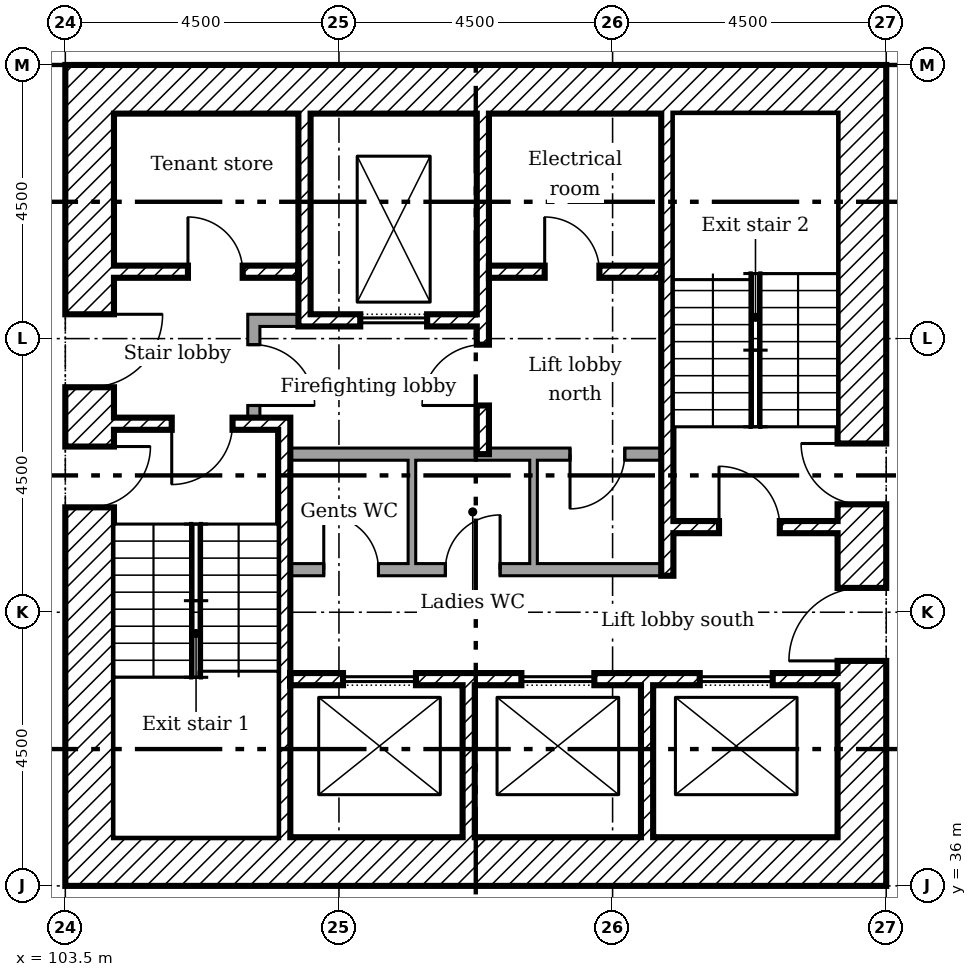
"""IFC4 building model, lengths in metres.
Left out: names, types, materials, properties, quantities, classifications, styles, units other than length and angle.
Written with IfcOpenShell. Run it as: python <this file> out.ifc"""

import sys

from ifc_helpers import new_model, si_unit, direction, frame, frame_2d, origin, place, context, subcontext, project, spatial, rectangle, extrude, element, fill, save


model = new_model("IFC4")
c1 = context("Model", 3, precision=1e-05, world=origin(), true_north=direction((0.0, 1.0)))
c2 = subcontext(c1, "Body", "Model", "MODEL_VIEW")
j1 = project(units=[si_unit("LENGTHUNIT", "METRE"), si_unit("PLANEANGLEUNIT", "RADIAN")], contexts=[c1])
p1 = place(None, origin())
s1 = spatial("IfcSite", under=j1, at=p1, CompositionType="ELEMENT")
p2 = place(p1, origin())
s2 = spatial("IfcBuilding", under=s1, at=p2, CompositionType="ELEMENT")
p3 = place(p2, frame((0.0, 0.0, 47.4)))
s3 = spatial("IfcBuildingStorey", under=s2, at=p3, CompositionType="ELEMENT", Elevation=47.4)
p4 = place(p3, frame((116.6, 36.0, 0.0), z_axis=(0.0, 0.0, 1.0), x_axis=(0.0, 1.0, 0.0)))
e1 = element("IfcWall", 1, at=p4, inside=s3, PredefinedType="SHEAR", context=c2, shape_type="SweptSolid", body=[
    extrude(rectangle(XDim=13.5, YDim=0.8, at=frame_2d((6.75, 0.0))), origin(), (0.0, 0.0, 1.0), 3.35),
])
p5 = place(p4, frame((3.7, 0.0, 0.0)))
e2 = element("IfcOpeningElement", 2, at=p5, cuts=e1, PredefinedType="OPENING", context=c2, shape_type="SweptSolid", body=[
    extrude(rectangle(XDim=1.2, YDim=2.1, at=frame_2d((0.6, 1.05))), frame((0.0, 0.41, 0.0), z_axis=(0.0, -1.0, 0.0), x_axis=(1.0, 0.0, 0.0)), (0.0, 0.0, 1.0), 0.82),
])
p6 = place(p4, frame((6.275, 0.0, 0.0)))
e3 = element("IfcOpeningElement", 3, at=p6, cuts=e1, PredefinedType="OPENING", context=c2, shape_type="SweptSolid", body=[
    extrude(rectangle(XDim=1.0, YDim=2.1, at=frame_2d((0.5, 1.05))), frame((0.0, 0.41, 0.0), z_axis=(0.0, -1.0, 0.0), x_axis=(1.0, 0.0, 0.0)), (0.0, 0.0, 1.0), 0.82),
])
for number, where in (
    (4, (104.3, 49.1, 0.0)),
    (5, (104.3, 36.4, 0.0)),
):
    element("IfcWall", number, at=place(p3, frame(where)), inside=s3, PredefinedType="SHEAR", context=c2, shape_type="SweptSolid", body=[
        extrude(rectangle(XDim=11.9, YDim=0.8, at=frame_2d((5.95, 0.0))), origin(), (0.0, 0.0, 1.0), 3.35),
    ])
p7 = place(p3, frame((103.9, 36.0, 0.0), z_axis=(0.0, 0.0, 1.0), x_axis=(0.0, 1.0, 0.0)))
e6 = element("IfcWall", 6, at=p7, inside=s3, PredefinedType="SHEAR", context=c2, shape_type="SweptSolid", body=[
    extrude(rectangle(XDim=13.5, YDim=0.8, at=frame_2d((6.75, 0.0))), origin(), (0.0, 0.0, 1.0), 3.35),
])
p8 = place(p7, frame((8.2, 0.0, 0.0)))
e7 = element("IfcOpeningElement", 7, at=p8, cuts=e6, PredefinedType="OPENING", context=c2, shape_type="SweptSolid", body=[
    extrude(rectangle(XDim=1.2, YDim=2.1, at=frame_2d((0.6, 1.05))), frame((0.0, 0.41, 0.0), z_axis=(0.0, -1.0, 0.0), x_axis=(1.0, 0.0, 0.0)), (0.0, 0.0, 1.0), 0.82),
])
p9 = place(p7, frame((6.225, 0.0, 0.0)))
e8 = element("IfcOpeningElement", 8, at=p9, cuts=e6, PredefinedType="OPENING", context=c2, shape_type="SweptSolid", body=[
    extrude(rectangle(XDim=1.0, YDim=2.1, at=frame_2d((0.5, 1.05))), frame((0.0, 0.41, 0.0), z_axis=(0.0, -1.0, 0.0), x_axis=(1.0, 0.0, 0.0)), (0.0, 0.0, 1.0), 0.82),
])
p10 = place(p3, frame((107.433, 48.7, 0.0), z_axis=(0.0, 0.0, 1.0), x_axis=(0.0, -1.0, 0.0)))
e9 = element("IfcWall", 9, at=p10, inside=s3, PredefinedType="SHEAR", context=c2, shape_type="SweptSolid", body=[
    extrude(rectangle(XDim=3.5, YDim=0.2, at=frame_2d((1.75, 0.0))), origin(), (0.0, 0.0, 1.0), 3.35),
])
p11 = place(p3, frame((110.367, 48.7, 0.0), z_axis=(0.0, 0.0, 1.0), x_axis=(0.0, -1.0, 0.0)))
e10 = element("IfcWall", 10, at=p11, inside=s3, PredefinedType="SHEAR", context=c2, shape_type="SweptSolid", body=[
    extrude(rectangle(XDim=5.6, YDim=0.2, at=frame_2d((2.8, 0.0))), origin(), (0.0, 0.0, 1.0), 3.35),
])
p12 = place(p11, frame((3.8, 0.0, 0.0)))
e11 = element("IfcOpeningElement", 11, at=p12, cuts=e10, PredefinedType="OPENING", context=c2, shape_type="SweptSolid", body=[
    extrude(rectangle(XDim=1.0, YDim=2.1, at=frame_2d((0.5, 1.05))), frame((0.0, 0.11, 0.0), z_axis=(0.0, -1.0, 0.0), x_axis=(1.0, 0.0, 0.0)), (0.0, 0.0, 1.0), 0.22),
])
for number, where, z_axis, x_axis in (
    (12, (110.133, 36.8, 0.0), (0.0, 0.0, 1.0), (0.0, 1.0, 0.0)),
    (13, (113.067, 36.8, 0.0), (0.0, 0.0, 1.0), (0.0, 1.0, 0.0)),
):
    element("IfcWall", number, at=place(p3, frame(where, z_axis=z_axis, x_axis=x_axis)), inside=s3, PredefinedType="SHEAR", context=c2, shape_type="SweptSolid", body=[
        extrude(rectangle(XDim=2.5, YDim=0.2, at=frame_2d((1.25, 0.0))), origin(), (0.0, 0.0, 1.0), 3.35),
    ])
p13 = place(p3, frame((106.5, 45.3, 0.0)))
e14 = element("IfcWall", 14, at=p13, inside=s3, PredefinedType="PARTITIONING", context=c2, shape_type="SweptSolid", body=[
    extrude(rectangle(XDim=0.833, YDim=0.2, at=frame_2d((0.417, 0.0))), origin(), (0.0, 0.0, 1.0), 3.35),
])
p14 = place(p3, frame((106.6, 43.7, 0.0), z_axis=(0.0, 0.0, 1.0), x_axis=(0.0, 1.0, 0.0)))
e15 = element("IfcWall", 15, at=p14, inside=s3, PredefinedType="PARTITIONING", context=c2, shape_type="SweptSolid", body=[
    extrude(rectangle(XDim=1.5, YDim=0.2, at=frame_2d((0.75, 0.0))), origin(), (0.0, 0.0, 1.0), 3.35),
])
p15 = place(p14, frame((0.2, 0.0, 0.0)))
e16 = element("IfcOpeningElement", 16, at=p15, cuts=e15, PredefinedType="OPENING", context=c2, shape_type="SweptSolid", body=[
    extrude(rectangle(XDim=1.0, YDim=2.1, at=frame_2d((0.5, 1.05))), frame((0.0, 0.11, 0.0), z_axis=(0.0, -1.0, 0.0), x_axis=(1.0, 0.0, 0.0)), (0.0, 0.0, 1.0), 0.22),
])
p16 = place(p3, frame((104.3, 46.1, 0.0)))
e17 = element("IfcWall", 17, at=p16, inside=s3, PredefinedType="SHEAR", context=c2, shape_type="SweptSolid", body=[
    extrude(rectangle(XDim=3.033, YDim=0.2, at=frame_2d((1.517, 0.0))), origin(), (0.0, 0.0, 1.0), 3.35),
])
p17 = place(p16, frame((1.217, 0.0, 0.0)))
e18 = element("IfcOpeningElement", 18, at=p17, cuts=e17, PredefinedType="OPENING", context=c2, shape_type="SweptSolid", body=[
    extrude(rectangle(XDim=0.9, YDim=2.1, at=frame_2d((0.45, 1.05))), frame((0.0, 0.11, 0.0), z_axis=(0.0, -1.0, 0.0), x_axis=(1.0, 0.0, 0.0)), (0.0, 0.0, 1.0), 0.22),
])
p18 = place(p3, frame((110.467, 46.1, 0.0)))
e19 = element("IfcWall", 19, at=p18, inside=s3, PredefinedType="SHEAR", context=c2, shape_type="SweptSolid", body=[
    extrude(rectangle(XDim=2.833, YDim=0.2, at=frame_2d((1.417, 0.0))), origin(), (0.0, 0.0, 1.0), 3.35),
])
p19 = place(p18, frame((0.917, 0.0, 0.0)))
e20 = element("IfcOpeningElement", 20, at=p19, cuts=e19, PredefinedType="OPENING", context=c2, shape_type="SweptSolid", body=[
    extrude(rectangle(XDim=0.9, YDim=2.1, at=frame_2d((0.45, 1.05))), frame((0.0, 0.11, 0.0), z_axis=(0.0, -1.0, 0.0), x_axis=(1.0, 0.0, 0.0)), (0.0, 0.0, 1.0), 0.22),
])
p20 = place(p3, frame((107.533, 45.3, 0.0)))
e21 = element("IfcWall", 21, at=p20, inside=s3, PredefinedType="SHEAR", context=c2, shape_type="SweptSolid", body=[
    extrude(rectangle(XDim=2.733, YDim=0.2, at=frame_2d((1.367, 0.0))), origin(), (0.0, 0.0, 1.0), 3.35),
])
p21 = place(p20, frame((0.817, 0.0, 0.0)))
e22 = element("IfcOpeningElement", 22, at=p21, cuts=e21, PredefinedType="OPENING", context=c2, shape_type="SweptSolid", body=[
    extrude(rectangle(XDim=1.1, YDim=2.1, at=frame_2d((0.55, 1.05))), frame((0.0, 0.11, 0.0), z_axis=(0.0, -1.0, 0.0), x_axis=(1.0, 0.0, 0.0)), (0.0, 0.0, 1.0), 0.22),
])
p22 = place(p3, frame((107.2, 39.4, 0.0)))
e23 = element("IfcWall", 23, at=p22, inside=s3, PredefinedType="SHEAR", context=c2, shape_type="SweptSolid", body=[
    extrude(rectangle(XDim=9.0, YDim=0.2, at=frame_2d((4.5, 0.0))), origin(), (0.0, 0.0, 1.0), 3.35),
])
p23 = place(p22, frame((0.867, 0.0, 0.0)))
e24 = element("IfcOpeningElement", 24, at=p23, cuts=e23, PredefinedType="OPENING", context=c2, shape_type="SweptSolid", body=[
    extrude(rectangle(XDim=1.2, YDim=2.1, at=frame_2d((0.6, 1.05))), frame((0.0, 0.11, 0.0), z_axis=(0.0, -1.0, 0.0), x_axis=(1.0, 0.0, 0.0)), (0.0, 0.0, 1.0), 0.22),
])
p24 = place(p22, frame((3.8, 0.0, 0.0)))
e25 = element("IfcOpeningElement", 25, at=p24, cuts=e23, PredefinedType="OPENING", context=c2, shape_type="SweptSolid", body=[
    extrude(rectangle(XDim=1.2, YDim=2.1, at=frame_2d((0.6, 1.05))), frame((0.0, 0.11, 0.0), z_axis=(0.0, -1.0, 0.0), x_axis=(1.0, 0.0, 0.0)), (0.0, 0.0, 1.0), 0.22),
])
p25 = place(p22, frame((6.733, 0.0, 0.0)))
e26 = element("IfcOpeningElement", 26, at=p25, cuts=e23, PredefinedType="OPENING", context=c2, shape_type="SweptSolid", body=[
    extrude(rectangle(XDim=1.2, YDim=2.1, at=frame_2d((0.6, 1.05))), frame((0.0, 0.11, 0.0), z_axis=(0.0, -1.0, 0.0), x_axis=(1.0, 0.0, 0.0)), (0.0, 0.0, 1.0), 0.22),
])
p26 = place(p3, frame((107.1, 36.8, 0.0), z_axis=(0.0, 0.0, 1.0), x_axis=(0.0, 1.0, 0.0)))
e27 = element("IfcWall", 27, at=p26, inside=s3, PredefinedType="SHEAR", context=c2, shape_type="SweptSolid", body=[
    extrude(rectangle(XDim=6.9, YDim=0.2, at=frame_2d((3.45, 0.0))), origin(), (0.0, 0.0, 1.0), 3.35),
])
p27 = place(p3, frame((104.3, 43.6, 0.0)))
e28 = element("IfcWall", 28, at=p27, inside=s3, PredefinedType="SHEAR", context=c2, shape_type="SweptSolid", body=[
    extrude(rectangle(XDim=2.7, YDim=0.2, at=frame_2d((1.35, 0.0))), origin(), (0.0, 0.0, 1.0), 3.35),
])
p28 = place(p27, frame((0.95, 0.0, 0.0)))
e29 = element("IfcOpeningElement", 29, at=p28, cuts=e28, PredefinedType="OPENING", context=c2, shape_type="SweptSolid", body=[
    extrude(rectangle(XDim=1.0, YDim=2.1, at=frame_2d((0.5, 1.05))), frame((0.0, 0.11, 0.0), z_axis=(0.0, -1.0, 0.0), x_axis=(1.0, 0.0, 0.0)), (0.0, 0.0, 1.0), 0.22),
])
p29 = place(p3, frame((113.5, 41.9, 0.0)))
e30 = element("IfcWall", 30, at=p29, inside=s3, PredefinedType="SHEAR", context=c2, shape_type="SweptSolid", body=[
    extrude(rectangle(XDim=2.7, YDim=0.2, at=frame_2d((1.35, 0.0))), origin(), (0.0, 0.0, 1.0), 3.35),
])
p30 = place(p29, frame((0.75, 0.0, 0.0)))
e31 = element("IfcOpeningElement", 31, at=p30, cuts=e30, PredefinedType="OPENING", context=c2, shape_type="SweptSolid", body=[
    extrude(rectangle(XDim=1.0, YDim=2.1, at=frame_2d((0.5, 1.05))), frame((0.0, 0.11, 0.0), z_axis=(0.0, -1.0, 0.0), x_axis=(1.0, 0.0, 0.0)), (0.0, 0.0, 1.0), 0.22),
])
p31 = place(p3, frame((113.4, 41.1, 0.0), z_axis=(0.0, 0.0, 1.0), x_axis=(0.0, 1.0, 0.0)))
e32 = element("IfcWall", 32, at=p31, inside=s3, PredefinedType="SHEAR", context=c2, shape_type="SweptSolid", body=[
    extrude(rectangle(XDim=7.6, YDim=0.2, at=frame_2d((3.8, 0.0))), origin(), (0.0, 0.0, 1.0), 3.35),
])
p32 = place(p3, frame((107.2, 43.1, 0.0)))
e33 = element("IfcWall", 33, at=p32, inside=s3, PredefinedType="PARTITIONING", context=c2, shape_type="SweptSolid", body=[
    extrude(rectangle(XDim=6.1, YDim=0.2, at=frame_2d((3.05, 0.0))), origin(), (0.0, 0.0, 1.0), 3.35),
])
p33 = place(p32, frame((4.6, 0.0, 0.0)))
e34 = element("IfcOpeningElement", 34, at=p33, cuts=e33, PredefinedType="OPENING", context=c2, shape_type="SweptSolid", body=[
    extrude(rectangle(XDim=0.9, YDim=2.1, at=frame_2d((0.45, 1.05))), frame((0.0, 0.11, 0.0), z_axis=(0.0, -1.0, 0.0), x_axis=(1.0, 0.0, 0.0)), (0.0, 0.0, 1.0), 0.22),
])
p34 = place(p3, frame((107.2, 41.2, 0.0)))
e35 = element("IfcWall", 35, at=p34, inside=s3, PredefinedType="PARTITIONING", context=c2, shape_type="SweptSolid", body=[
    extrude(rectangle(XDim=6.1, YDim=0.2, at=frame_2d((3.05, 0.0))), origin(), (0.0, 0.0, 1.0), 3.35),
])
p35 = place(p34, frame((0.55, 0.0, 0.0)))
e36 = element("IfcOpeningElement", 36, at=p35, cuts=e35, PredefinedType="OPENING", context=c2, shape_type="SweptSolid", body=[
    extrude(rectangle(XDim=0.9, YDim=2.1, at=frame_2d((0.45, 1.05))), frame((0.0, 0.11, 0.0), z_axis=(0.0, -1.0, 0.0), x_axis=(1.0, 0.0, 0.0)), (0.0, 0.0, 1.0), 0.22),
])
p36 = place(p34, frame((2.55, 0.0, 0.0)))
e37 = element("IfcOpeningElement", 37, at=p36, cuts=e35, PredefinedType="OPENING", context=c2, shape_type="SweptSolid", body=[
    extrude(rectangle(XDim=0.9, YDim=2.1, at=frame_2d((0.45, 1.05))), frame((0.0, 0.11, 0.0), z_axis=(0.0, -1.0, 0.0), x_axis=(1.0, 0.0, 0.0)), (0.0, 0.0, 1.0), 0.22),
])
for number, where, z_axis, x_axis in (
    (38, (109.2, 41.3, 0.0), (0.0, 0.0, 1.0), (0.0, 1.0, 0.0)),
    (39, (111.2, 41.3, 0.0), (0.0, 0.0, 1.0), (0.0, 1.0, 0.0)),
):
    element("IfcWall", number, at=place(p3, frame(where, z_axis=z_axis, x_axis=x_axis)), inside=s3, PredefinedType="PARTITIONING", context=c2, shape_type="SweptSolid", body=[
        extrude(rectangle(XDim=1.7, YDim=0.125, at=frame_2d((0.85, 0.0))), origin(), (0.0, 0.0, 1.0), 3.35),
    ])
p37 = place(p8, frame((1.2, 0.0, 0.0), x_axis=(-1.0, 0.0, 0.0)))
e40 = element("IfcDoor", 40, at=p37, inside=s3, OperationType="SINGLE_SWING_RIGHT", PredefinedType="DOOR", context=c2, shape_type="SweptSolid", body=[
    extrude(rectangle(XDim=1.2, YDim=2.1, at=frame_2d((0.6, 1.05))), frame((0.0, 0.025, 0.0), z_axis=(0.0, -1.0, 0.0), x_axis=(1.0, 0.0, 0.0)), (0.0, 0.0, 1.0), 0.05),
])
fill(e7, e40)
p38 = place(p5, origin())
e41 = element("IfcDoor", 41, at=p38, inside=s3, OperationType="SINGLE_SWING_RIGHT", PredefinedType="DOOR", context=c2, shape_type="SweptSolid", body=[
    extrude(rectangle(XDim=1.2, YDim=2.1, at=frame_2d((0.6, 1.05))), frame((0.0, 0.025, 0.0), z_axis=(0.0, -1.0, 0.0), x_axis=(1.0, 0.0, 0.0)), (0.0, 0.0, 1.0), 0.05),
])
fill(e2, e41)
p39 = place(p28, frame((1.0, 0.0, 0.0), x_axis=(-1.0, 0.0, 0.0)))
e42 = element("IfcDoor", 42, at=p39, inside=s3, OperationType="SINGLE_SWING_LEFT", PredefinedType="DOOR", context=c2, shape_type="SweptSolid", body=[
    extrude(rectangle(XDim=1.0, YDim=2.1, at=frame_2d((0.5, 1.05))), frame((0.0, 0.025, 0.0), z_axis=(0.0, -1.0, 0.0), x_axis=(1.0, 0.0, 0.0)), (0.0, 0.0, 1.0), 0.05),
])
fill(e29, e42)
p40 = place(p9, frame((1.0, 0.0, 0.0), x_axis=(-1.0, 0.0, 0.0)))
e43 = element("IfcDoor", 43, at=p40, inside=s3, OperationType="SINGLE_SWING_RIGHT", PredefinedType="DOOR", context=c2, shape_type="SweptSolid", body=[
    extrude(rectangle(XDim=1.0, YDim=2.1, at=frame_2d((0.5, 1.05))), frame((0.0, 0.025, 0.0), z_axis=(0.0, -1.0, 0.0), x_axis=(1.0, 0.0, 0.0)), (0.0, 0.0, 1.0), 0.05),
])
fill(e8, e43)
p41 = place(p30, origin())
e44 = element("IfcDoor", 44, at=p41, inside=s3, OperationType="SINGLE_SWING_RIGHT", PredefinedType="DOOR", context=c2, shape_type="SweptSolid", body=[
    extrude(rectangle(XDim=1.0, YDim=2.1, at=frame_2d((0.5, 1.05))), frame((0.0, 0.025, 0.0), z_axis=(0.0, -1.0, 0.0), x_axis=(1.0, 0.0, 0.0)), (0.0, 0.0, 1.0), 0.05),
])
fill(e31, e44)
p42 = place(p6, origin())
e45 = element("IfcDoor", 45, at=p42, inside=s3, OperationType="SINGLE_SWING_LEFT", PredefinedType="DOOR", context=c2, shape_type="SweptSolid", body=[
    extrude(rectangle(XDim=1.0, YDim=2.1, at=frame_2d((0.5, 1.05))), frame((0.0, 0.025, 0.0), z_axis=(0.0, -1.0, 0.0), x_axis=(1.0, 0.0, 0.0)), (0.0, 0.0, 1.0), 0.05),
])
fill(e3, e45)
p43 = place(p12, frame((1.0, 0.0, 0.0), x_axis=(-1.0, 0.0, 0.0)))
e46 = element("IfcDoor", 46, at=p43, inside=s3, OperationType="SINGLE_SWING_RIGHT", PredefinedType="DOOR", context=c2, shape_type="SweptSolid", body=[
    extrude(rectangle(XDim=1.0, YDim=2.1, at=frame_2d((0.5, 1.05))), frame((0.0, 0.025, 0.0), z_axis=(0.0, -1.0, 0.0), x_axis=(1.0, 0.0, 0.0)), (0.0, 0.0, 1.0), 0.05),
])
fill(e11, e46)
p44 = place(p15, frame((1.0, 0.0, 0.0), x_axis=(-1.0, 0.0, 0.0)))
e47 = element("IfcDoor", 47, at=p44, inside=s3, OperationType="SINGLE_SWING_LEFT", PredefinedType="DOOR", context=c2, shape_type="SweptSolid", body=[
    extrude(rectangle(XDim=1.0, YDim=2.1, at=frame_2d((0.5, 1.05))), frame((0.0, 0.025, 0.0), z_axis=(0.0, -1.0, 0.0), x_axis=(1.0, 0.0, 0.0)), (0.0, 0.0, 1.0), 0.05),
])
fill(e16, e47)
p45 = place(p17, origin())
e48 = element("IfcDoor", 48, at=p45, inside=s3, OperationType="SINGLE_SWING_RIGHT", PredefinedType="DOOR", context=c2, shape_type="SweptSolid", body=[
    extrude(rectangle(XDim=0.9, YDim=2.1, at=frame_2d((0.45, 1.05))), frame((0.0, 0.025, 0.0), z_axis=(0.0, -1.0, 0.0), x_axis=(1.0, 0.0, 0.0)), (0.0, 0.0, 1.0), 0.05),
])
fill(e18, e48)
p46 = place(p19, origin())
e49 = element("IfcDoor", 49, at=p46, inside=s3, OperationType="SINGLE_SWING_RIGHT", PredefinedType="DOOR", context=c2, shape_type="SweptSolid", body=[
    extrude(rectangle(XDim=0.9, YDim=2.1, at=frame_2d((0.45, 1.05))), frame((0.0, 0.025, 0.0), z_axis=(0.0, -1.0, 0.0), x_axis=(1.0, 0.0, 0.0)), (0.0, 0.0, 1.0), 0.05),
])
fill(e20, e49)
p47 = place(p35, origin())
e50 = element("IfcDoor", 50, at=p47, inside=s3, OperationType="SINGLE_SWING_RIGHT", PredefinedType="DOOR", context=c2, shape_type="SweptSolid", body=[
    extrude(rectangle(XDim=0.9, YDim=2.1, at=frame_2d((0.45, 1.05))), frame((0.0, 0.025, 0.0), z_axis=(0.0, -1.0, 0.0), x_axis=(1.0, 0.0, 0.0)), (0.0, 0.0, 1.0), 0.05),
])
fill(e36, e50)
p48 = place(p36, origin())
e51 = element("IfcDoor", 51, at=p48, inside=s3, OperationType="SINGLE_SWING_LEFT", PredefinedType="DOOR", context=c2, shape_type="SweptSolid", body=[
    extrude(rectangle(XDim=0.9, YDim=2.1, at=frame_2d((0.45, 1.05))), frame((0.0, 0.025, 0.0), z_axis=(0.0, -1.0, 0.0), x_axis=(1.0, 0.0, 0.0)), (0.0, 0.0, 1.0), 0.05),
])
fill(e37, e51)
p49 = place(p33, frame((0.9, 0.0, 0.0), x_axis=(-1.0, 0.0, 0.0)))
e52 = element("IfcDoor", 52, at=p49, inside=s3, OperationType="SINGLE_SWING_LEFT", PredefinedType="DOOR", context=c2, shape_type="SweptSolid", body=[
    extrude(rectangle(XDim=0.9, YDim=2.1, at=frame_2d((0.45, 1.05))), frame((0.0, 0.025, 0.0), z_axis=(0.0, -1.0, 0.0), x_axis=(1.0, 0.0, 0.0)), (0.0, 0.0, 1.0), 0.05),
])
fill(e34, e52)
p50 = place(p21, origin())
e53 = element("IfcDoor", 53, at=p50, inside=s3, OperationType="SLIDING_TO_LEFT", PredefinedType="DOOR", context=c2, shape_type="SweptSolid", body=[
    extrude(rectangle(XDim=1.1, YDim=2.1, at=frame_2d((0.55, 1.05))), frame((0.0, 0.025, 0.0), z_axis=(0.0, -1.0, 0.0), x_axis=(1.0, 0.0, 0.0)), (0.0, 0.0, 1.0), 0.05),
])
fill(e22, e53)
p51 = place(p23, origin())
e54 = element("IfcDoor", 54, at=p51, inside=s3, OperationType="SLIDING_TO_LEFT", PredefinedType="DOOR", context=c2, shape_type="SweptSolid", body=[
    extrude(rectangle(XDim=1.2, YDim=2.1, at=frame_2d((0.6, 1.05))), frame((0.0, 0.025, 0.0), z_axis=(0.0, -1.0, 0.0), x_axis=(1.0, 0.0, 0.0)), (0.0, 0.0, 1.0), 0.05),
])
fill(e24, e54)
p52 = place(p24, origin())
e55 = element("IfcDoor", 55, at=p52, inside=s3, OperationType="SLIDING_TO_LEFT", PredefinedType="DOOR", context=c2, shape_type="SweptSolid", body=[
    extrude(rectangle(XDim=1.2, YDim=2.1, at=frame_2d((0.6, 1.05))), frame((0.0, 0.025, 0.0), z_axis=(0.0, -1.0, 0.0), x_axis=(1.0, 0.0, 0.0)), (0.0, 0.0, 1.0), 0.05),
])
fill(e25, e55)
p53 = place(p25, origin())
e56 = element("IfcDoor", 56, at=p53, inside=s3, OperationType="SLIDING_TO_LEFT", PredefinedType="DOOR", context=c2, shape_type="SweptSolid", body=[
    extrude(rectangle(XDim=1.2, YDim=2.1, at=frame_2d((0.6, 1.05))), frame((0.0, 0.025, 0.0), z_axis=(0.0, -1.0, 0.0), x_axis=(1.0, 0.0, 0.0)), (0.0, 0.0, 1.0), 0.05),
])
fill(e26, e56)
save(model, sys.argv[1])
